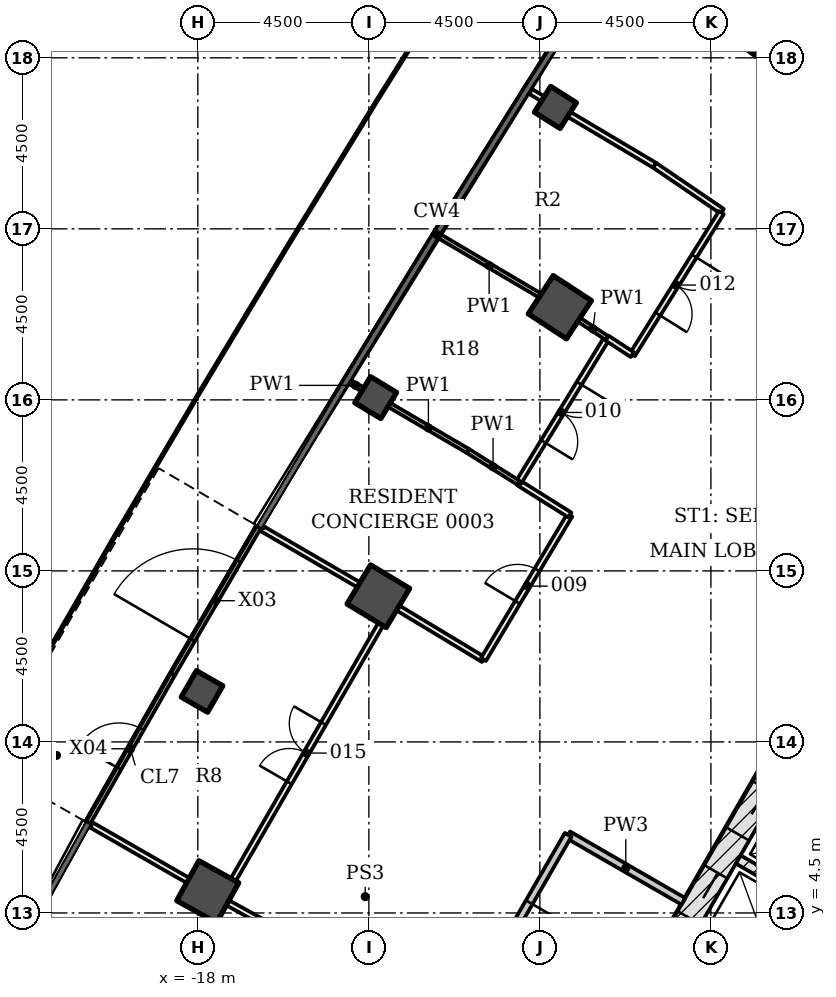
"""IFC4 building model, lengths in metres.
Left out: names, types, materials, properties, quantities, classifications, styles, units other than length and angle.
Written with IfcOpenShell. Run it as: python <this file> out.ifc"""

import sys

from ifc_helpers import new_model, si_unit, direction, frame, frame_2d, origin, origin_2d, place, context, subcontext, project, spatial, rectangle, extrude, element, fill, save


model = new_model("IFC4")
c1 = context("Model", 3, precision=1e-05, world=origin(), true_north=direction((0.0, 1.0)))
c2 = subcontext(c1, "Body", "Model", "MODEL_VIEW")
j1 = project(units=[si_unit("LENGTHUNIT", "METRE"), si_unit("PLANEANGLEUNIT", "RADIAN")], contexts=[c1])
p1 = place(None, origin())
s1 = spatial("IfcSite", under=j1, at=p1, CompositionType="ELEMENT")
p2 = place(p1, origin())
s2 = spatial("IfcBuilding", under=s1, at=p2, CompositionType="ELEMENT")
p3 = place(p2, origin())
s3 = spatial("IfcBuildingStorey", under=s2, at=p3, CompositionType="ELEMENT", Elevation=0.0)
for number, where, z_axis, x_axis in (
    (1, (-3.421, 27.86, -0.25), (0.0, 0.0, 1.0), (-0.816, 0.578, 0.0)),
    (2, (-8.475, 20.438, -0.25), (0.0, 0.0, 1.0), (-0.837, 0.547, 0.0)),
    (3, (-13.25, 12.834, -0.25), (0.0, 0.0, 1.0), (-0.857, 0.516, 0.0)),
    (4, (-17.739, 5.058, -0.25), (0.0, 0.0, 1.0), (-0.875, 0.484, 0.0)),
):
    element("IfcColumn", number, at=place(p3, frame(where, z_axis=z_axis, x_axis=x_axis)), inside=s3, PredefinedType="COLUMN", context=c2, shape_type="SweptSolid", body=[
        extrude(rectangle(XDim=1.2, YDim=1.2, at=origin_2d()), origin(), (0.0, 0.0, 1.0), 6.0),
    ])
for number, where, z_axis, x_axis in (
    (5, (-8.592, 25.695, -0.25), (0.0, 0.0, 1.0), (-0.845, 0.535, 0.0)),
    (6, (-13.32, 18.059, -0.25), (0.0, 0.0, 1.0), (-0.856, 0.518, 0.0)),
    (7, (-17.89, 10.329, -0.25), (0.0, 0.0, 1.0), (-0.866, 0.5, 0.0)),
):
    element("IfcColumn", number, at=place(p3, frame(where, z_axis=z_axis, x_axis=x_axis)), inside=s3, PredefinedType="COLUMN", context=c2, shape_type="SweptSolid", body=[
        extrude(rectangle(XDim=0.8, YDim=0.8, at=origin_2d()), origin(), (0.0, 0.0, 1.0), 6.0),
    ])
p4 = place(p3, frame((-1.083, 11.281, -0.25), z_axis=(0.0, 0.0, 1.0), x_axis=(-0.500001446645, -0.866024568562, 0.0)))
e8 = element("IfcWall", 8, at=p4, inside=s3, PredefinedType="SHEAR", context=c2, shape_type="SweptSolid", body=[
    extrude(rectangle(XDim=18.458, YDim=0.7, at=frame_2d((9.229, 0.0))), origin(), (0.0, 0.0, 1.0), 6.0),
])
p5 = place(p4, frame((4.029, 0.0, 0.25)))
e9 = element("IfcOpeningElement", 9, at=p5, cuts=e8, PredefinedType="OPENING", context=c2, shape_type="SweptSolid", body=[
    extrude(rectangle(XDim=1.4, YDim=2.1, at=frame_2d((0.7, 1.05))), frame((0.0, 0.36, 0.0), z_axis=(0.0, -1.0, 0.0), x_axis=(1.0, 0.0, 0.0)), (0.0, 0.0, 1.0), 0.72),
])
p6 = place(p4, frame((6.579, 0.0, 0.25)))
e10 = element("IfcOpeningElement", 10, at=p6, cuts=e8, PredefinedType="OPENING", context=c2, shape_type="SweptSolid", body=[
    extrude(rectangle(XDim=1.4, YDim=2.1, at=frame_2d((0.7, 1.05))), frame((0.0, 0.36, 0.0), z_axis=(0.0, -1.0, 0.0), x_axis=(1.0, 0.0, 0.0)), (0.0, 0.0, 1.0), 0.72),
])
p7 = place(p4, frame((8.979, 0.0, 0.25)))
e11 = element("IfcOpeningElement", 11, at=p7, cuts=e8, PredefinedType="OPENING", context=c2, shape_type="SweptSolid", body=[
    extrude(rectangle(XDim=1.2, YDim=2.1, at=frame_2d((0.6, 1.05))), frame((0.0, 0.36, 0.0), z_axis=(0.0, -1.0, 0.0), x_axis=(1.0, 0.0, 0.0)), (0.0, 0.0, 1.0), 0.72),
])
p8 = place(p4, frame((11.029, 0.0, 0.25)))
e12 = element("IfcOpeningElement", 12, at=p8, cuts=e8, PredefinedType="OPENING", context=c2, shape_type="SweptSolid", body=[
    extrude(rectangle(XDim=1.2, YDim=2.1, at=frame_2d((0.6, 1.05))), frame((0.0, 0.36, 0.0), z_axis=(0.0, -1.0, 0.0), x_axis=(1.0, 0.0, 0.0)), (0.0, 0.0, 1.0), 0.72),
])
p9 = place(p4, frame((13.179, 0.0, 0.25)))
e13 = element("IfcOpeningElement", 13, at=p9, cuts=e8, PredefinedType="OPENING", context=c2, shape_type="SweptSolid", body=[
    extrude(rectangle(XDim=1.3, YDim=2.1, at=frame_2d((0.65, 1.05))), frame((0.0, 0.36, 0.0), z_axis=(0.0, -1.0, 0.0), x_axis=(1.0, 0.0, 0.0)), (0.0, 0.0, 1.0), 0.72),
])
p10 = place(p3, frame((-18.66, 10.775, 0.0), z_axis=(0.0, 0.0, 1.0), x_axis=(0.50445499627, 0.86343798662, 0.0)))
e14 = element("IfcWall", 14, at=p10, inside=s3, PredefinedType="NOTDEFINED", context=c2, shape_type="SweptSolid", body=[
    extrude(rectangle(XDim=4.496, YDim=0.12, at=frame_2d((2.248, 0.0))), origin(), (0.0, 0.0, 1.0), 5.75),
])
p11 = place(p10, frame((1.048, 0.0, 0.0)))
e15 = element("IfcOpeningElement", 15, at=p11, cuts=e14, PredefinedType="OPENING", context=c2, shape_type="SweptSolid", body=[
    extrude(rectangle(XDim=2.4, YDim=2.4, at=frame_2d((1.2, 1.2))), frame((0.0, 0.07, 0.0), z_axis=(0.0, -1.0, 0.0), x_axis=(1.0, 0.0, 0.0)), (0.0, 0.0, 1.0), 0.14),
])
p12 = place(p3, frame((-20.889, 6.867, 0.0), z_axis=(0.0, 0.0, 1.0), x_axis=(0.495501388328, 0.868607146048, 0.0)))
e16 = element("IfcWall", 16, at=p12, inside=s3, PredefinedType="NOTDEFINED", context=c2, shape_type="SweptSolid", body=[
    extrude(rectangle(XDim=4.496, YDim=0.12, at=frame_2d((2.248, 0.0))), origin(), (0.0, 0.0, 1.0), 5.75),
])
p13 = place(p12, frame((1.648, 0.0, 0.0)))
e17 = element("IfcOpeningElement", 17, at=p13, cuts=e16, PredefinedType="OPENING", context=c2, shape_type="SweptSolid", body=[
    extrude(rectangle(XDim=1.2, YDim=2.4, at=frame_2d((0.6, 1.2))), frame((0.0, 0.07, 0.0), z_axis=(0.0, -1.0, 0.0), x_axis=(1.0, 0.0, 0.0)), (0.0, 0.0, 1.0), 0.14),
])
p14 = place(p3, frame((-3.781, 5.907, -0.25), z_axis=(0.0, 0.0, 1.0), x_axis=(0.866032775405, -0.499987231761, 0.0)))
e18 = element("IfcWall", 18, at=p14, inside=s3, PredefinedType="PARTITIONING", context=c2, shape_type="SweptSolid", body=[
    extrude(rectangle(XDim=2.9, YDim=0.25, at=frame_2d((1.45, 0.0))), origin(), (0.0, 0.0, 1.0), 6.0),
])
p15 = place(p3, frame((0.176, 6.711, 0.0), z_axis=(0.0, 0.0, 1.0), x_axis=(-0.500004227369, -0.866022963098, 0.0)))
e19 = element("IfcWall", 19, at=p15, inside=s3, PredefinedType="PARTITIONING", context=c2, shape_type="SweptSolid", body=[
    extrude(rectangle(XDim=11.8, YDim=0.25, at=frame_2d((5.9, 0.0))), origin(), (0.0, 0.0, 1.0), 5.75),
])
p16 = place(p3, frame((-18.26, 5.356, 0.0), z_axis=(0.0, 0.0, 1.0), x_axis=(-0.867382463281, 0.497642102714, 0.0)))
e20 = element("IfcWall", 20, at=p16, inside=s3, PredefinedType="PARTITIONING", context=c2, shape_type="SweptSolid", body=[
    extrude(rectangle(XDim=2.972, YDim=0.15, at=frame_2d((1.486, 0.0))), origin(), (0.0, 0.0, 1.0), 5.133),
])
p17 = place(p3, frame((-15.615, 3.883, 0.0), z_axis=(0.0, 0.0, 1.0), x_axis=(-0.875170076202, 0.483815396325, 0.0)))
e21 = element("IfcWall", 21, at=p17, inside=s3, PredefinedType="PARTITIONING", context=c2, shape_type="SweptSolid", body=[
    extrude(rectangle(XDim=1.827, YDim=0.15, at=frame_2d((0.914, 0.0))), origin(), (0.0, 0.0, 1.0), 5.138),
])
p18 = place(p3, frame((-5.225, 4.806, 0.0), z_axis=(0.0, 0.0, 1.0), x_axis=(-0.865932233204, 0.500161341467, 0.0)))
e22 = element("IfcWall", 22, at=p18, inside=s3, PredefinedType="PARTITIONING", context=c2, shape_type="SweptSolid", body=[
    extrude(rectangle(XDim=3.499, YDim=0.2, at=frame_2d((1.75, 0.0))), origin(), (0.0, 0.0, 1.0), 5.75),
])
p19 = place(p3, frame((-8.256, 6.556, 0.0), z_axis=(0.0, 0.0, 1.0), x_axis=(-0.500040756506, -0.866001871726, 0.0)))
e23 = element("IfcWall", 23, at=p19, inside=s3, PredefinedType="PARTITIONING", context=c2, shape_type="SweptSolid", body=[
    extrude(rectangle(XDim=5.599, YDim=0.2, at=frame_2d((2.8, 0.0))), origin(), (0.0, 0.0, 1.0), 5.138),
])
p20 = place(p19, frame((2.05, 0.0, 0.0)))
e24 = element("IfcOpeningElement", 24, at=p20, cuts=e23, PredefinedType="OPENING", context=c2, shape_type="SweptSolid", body=[
    extrude(rectangle(XDim=1.5, YDim=2.1, at=frame_2d((0.75, 1.05))), frame((0.0, 0.11, 0.0), z_axis=(0.0, -1.0, 0.0), x_axis=(1.0, 0.0, 0.0)), (0.0, 0.0, 1.0), 0.22),
])
p21 = place(p3, frame((-13.769, 13.135, 0.0), z_axis=(0.0, 0.0, 1.0), x_axis=(-0.864594359068, 0.502470490943, 0.0)))
e25 = element("IfcWall", 25, at=p21, inside=s3, PredefinedType="PARTITIONING", context=c2, shape_type="SweptSolid", body=[
    extrude(rectangle(XDim=2.971, YDim=0.15, at=frame_2d((1.486, 0.0))), origin(), (0.0, 0.0, 1.0), 5.133),
])
p22 = place(p3, frame((-17.068, 5.372, 0.0), z_axis=(0.0, 0.0, 1.0), x_axis=(0.499910285078, 0.866077194523, 0.0)))
e26 = element("IfcWall", 26, at=p22, inside=s3, PredefinedType="PARTITIONING", context=c2, shape_type="SweptSolid", body=[
    extrude(rectangle(XDim=7.764, YDim=0.15, at=frame_2d((3.882, 0.0))), origin(), (0.0, 0.0, 1.0), 5.138),
])
p23 = place(p22, frame((2.95, 0.0, 0.0)))
e27 = element("IfcOpeningElement", 27, at=p23, cuts=e26, PredefinedType="OPENING", context=c2, shape_type="SweptSolid", body=[
    extrude(rectangle(XDim=1.8, YDim=2.1, at=frame_2d((0.9, 1.05))), frame((0.0, 0.085, 0.0), z_axis=(0.0, -1.0, 0.0), x_axis=(1.0, 0.0, 0.0)), (0.0, 0.0, 1.0), 0.17),
])
p24 = place(p3, frame((-12.735, 12.524, 0.0), z_axis=(0.0, 0.0, 1.0), x_axis=(0.856490884452, -0.516162149766, 0.0)))
e28 = element("IfcWall", 28, at=p24, inside=s3, PredefinedType="PARTITIONING", context=c2, shape_type="SweptSolid", body=[
    extrude(rectangle(XDim=2.627, YDim=0.15, at=frame_2d((1.313, 0.0))), origin(), (0.0, 0.0, 1.0), 5.138),
])
p25 = place(p3, frame((-10.485, 11.169, 0.0), z_axis=(0.0, 0.0, 1.0), x_axis=(0.513360176277, 0.858173251397, 0.0)))
e29 = element("IfcWall", 29, at=p25, inside=s3, PredefinedType="PARTITIONING", context=c2, shape_type="SweptSolid", body=[
    extrude(rectangle(XDim=4.428, YDim=0.15, at=frame_2d((2.214, 0.0))), origin(), (0.0, 0.0, 1.0), 5.138),
])
p26 = place(p25, frame((1.75, 0.0, 0.0)))
e30 = element("IfcOpeningElement", 30, at=p26, cuts=e29, PredefinedType="OPENING", context=c2, shape_type="SweptSolid", body=[
    extrude(rectangle(XDim=1.0, YDim=2.1, at=frame_2d((0.5, 1.05))), frame((0.0, 0.085, 0.0), z_axis=(0.0, -1.0, 0.0), x_axis=(1.0, 0.0, 0.0)), (0.0, 0.0, 1.0), 0.17),
])
p27 = place(p3, frame((-8.211, 14.971, 0.0), z_axis=(0.0, 0.0, 1.0), x_axis=(-0.846915577331, 0.531727378338, 0.0)))
e31 = element("IfcWall", 31, at=p27, inside=s3, PredefinedType="PARTITIONING", context=c2, shape_type="SweptSolid", body=[
    extrude(rectangle(XDim=1.599, YDim=0.15, at=frame_2d((0.799, 0.0))), origin(), (0.0, 0.0, 1.0), 5.138),
])
p28 = place(p3, frame((-13.658, 18.273, 0.0), z_axis=(0.0, 0.0, 1.0), x_axis=(-0.863201611898, 0.504859363801, 0.0)))
e32 = element("IfcWall", 32, at=p28, inside=s3, PredefinedType="PARTITIONING", context=c2, shape_type="SweptSolid", body=[
    extrude(rectangle(XDim=0.43, YDim=0.12, at=frame_2d((0.215, 0.0))), origin(), (0.0, 0.0, 1.0), 5.75),
])
p29 = place(p3, frame((-9.567, 15.822, 0.0), z_axis=(0.0, 0.0, 1.0), x_axis=(-0.846844435925, 0.531840672892, 0.0)))
e33 = element("IfcWall", 33, at=p29, inside=s3, PredefinedType="PARTITIONING", context=c2, shape_type="SweptSolid", body=[
    extrude(rectangle(XDim=1.572, YDim=0.12, at=frame_2d((0.786, 0.0))), origin(), (0.0, 0.0, 1.0), 5.138),
])
p30 = place(p3, frame((-10.898, 16.658, 0.0), z_axis=(0.0, 0.0, 1.0), x_axis=(-0.863161652457, 0.504927679701, 0.0)))
e34 = element("IfcWall", 34, at=p30, inside=s3, PredefinedType="PARTITIONING", context=c2, shape_type="SweptSolid", body=[
    extrude(rectangle(XDim=2.398, YDim=0.12, at=frame_2d((1.199, 0.0))), origin(), (0.0, 0.0, 1.0), 5.138),
])
p31 = place(p3, frame((-7.26, 19.588, 0.0), z_axis=(0.0, 0.0, 1.0), x_axis=(-0.522038122716, -0.852922152621, 0.0)))
e35 = element("IfcWall", 35, at=p31, inside=s3, PredefinedType="PARTITIONING", context=c2, shape_type="SweptSolid", body=[
    extrude(rectangle(XDim=4.415, YDim=0.15, at=frame_2d((2.208, 0.0))), origin(), (0.0, 0.0, 1.0), 5.138),
])
p32 = place(p31, frame((1.35, 0.0, 0.0)))
e36 = element("IfcOpeningElement", 36, at=p32, cuts=e35, PredefinedType="OPENING", context=c2, shape_type="SweptSolid", body=[
    extrude(rectangle(XDim=1.8, YDim=2.1, at=frame_2d((0.9, 1.05))), frame((0.0, 0.085, 0.0), z_axis=(0.0, -1.0, 0.0), x_axis=(1.0, 0.0, 0.0)), (0.0, 0.0, 1.0), 0.17),
])
p33 = place(p3, frame((-9.29, 26.141, 0.0), z_axis=(0.0, 0.0, 1.0), x_axis=(0.860041962333, -0.510223307019, 0.0)))
e37 = element("IfcWall", 37, at=p33, inside=s3, PredefinedType="PARTITIONING", context=c2, shape_type="SweptSolid", body=[
    extrude(rectangle(XDim=0.429, YDim=0.15, at=frame_2d((0.215, 0.0))), origin(), (0.0, 0.0, 1.0), 5.75),
])
p34 = place(p3, frame((-8.233, 25.512, 0.0), z_axis=(0.0, 0.0, 1.0), x_axis=(0.859460620951, -0.51120195719, 0.0)))
e38 = element("IfcWall", 38, at=p34, inside=s3, PredefinedType="PARTITIONING", context=c2, shape_type="SweptSolid", body=[
    extrude(rectangle(XDim=2.619, YDim=0.15, at=frame_2d((1.31, 0.0))), origin(), (0.0, 0.0, 1.0), 5.138),
])
p35 = place(p3, frame((-5.982, 24.173, 0.0), z_axis=(0.0, 0.0, 1.0), x_axis=(0.826407250565, -0.563072869364, 0.0)))
e39 = element("IfcWall", 39, at=p35, inside=s3, PredefinedType="PARTITIONING", context=c2, shape_type="SweptSolid", body=[
    extrude(rectangle(XDim=2.153, YDim=0.15, at=frame_2d((1.076, 0.0))), origin(), (0.0, 0.0, 1.0), 5.138),
])
p36 = place(p3, frame((-4.224, 22.928, 0.0), z_axis=(0.0, 0.0, 1.0), x_axis=(-0.53074011621, -0.847534618199, 0.0)))
e40 = element("IfcWall", 40, at=p36, inside=s3, PredefinedType="PARTITIONING", context=c2, shape_type="SweptSolid", body=[
    extrude(rectangle(XDim=4.41, YDim=0.15, at=frame_2d((2.205, 0.0))), origin(), (0.0, 0.0, 1.0), 5.138),
])
p37 = place(p36, frame((1.35, 0.0, 0.0)))
e41 = element("IfcOpeningElement", 41, at=p37, cuts=e40, PredefinedType="OPENING", context=c2, shape_type="SweptSolid", body=[
    extrude(rectangle(XDim=1.8, YDim=2.1, at=frame_2d((0.9, 1.05))), frame((0.0, 0.085, 0.0), z_axis=(0.0, -1.0, 0.0), x_axis=(1.0, 0.0, 0.0)), (0.0, 0.0, 1.0), 0.17),
])
p38 = place(p3, frame((-6.567, 19.19, 0.0), z_axis=(0.0, 0.0, 1.0), x_axis=(-0.837253455451, 0.546815006502, 0.0)))
e42 = element("IfcWall", 42, at=p38, inside=s3, PredefinedType="PARTITIONING", context=c2, shape_type="SweptSolid", body=[
    extrude(rectangle(XDim=0.803, YDim=0.15, at=frame_2d((0.401, 0.0))), origin(), (0.0, 0.0, 1.0), 5.138),
])
p39 = place(p3, frame((-8.992, 20.743, 0.0), z_axis=(0.0, 0.0, 1.0), x_axis=(-0.861458975043, 0.507827169733, 0.0)))
e43 = element("IfcWall", 43, at=p39, inside=s3, PredefinedType="PARTITIONING", context=c2, shape_type="SweptSolid", body=[
    extrude(rectangle(XDim=3.119, YDim=0.12, at=frame_2d((1.56, 0.0))), origin(), (0.0, 0.0, 1.0), 5.133),
])
p40 = place(p3, frame((-7.232, 19.625, 0.0), z_axis=(0.0, 0.0, 1.0), x_axis=(-0.837275659531, 0.546781007312, 0.0)))
e44 = element("IfcWall", 44, at=p40, inside=s3, PredefinedType="PARTITIONING", context=c2, shape_type="SweptSolid", body=[
    extrude(rectangle(XDim=0.885, YDim=0.12, at=frame_2d((0.442, 0.0))), origin(), (0.0, 0.0, 1.0), 5.138),
])
p41 = place(p11, origin())
e45 = element("IfcDoor", 45, at=p41, inside=s3, OperationType="REVOLVING", PredefinedType="DOOR", context=c2, shape_type="SweptSolid", body=[
    extrude(rectangle(XDim=2.4, YDim=2.4, at=frame_2d((1.2, 1.2))), frame((0.0, 0.025, 0.0), z_axis=(0.0, -1.0, 0.0), x_axis=(1.0, 0.0, 0.0)), (0.0, 0.0, 1.0), 0.05),
])
fill(e15, e45)
p42 = place(p13, origin())
e46 = element("IfcDoor", 46, at=p42, inside=s3, OperationType="SINGLE_SWING_LEFT", PredefinedType="DOOR", context=c2, shape_type="SweptSolid", body=[
    extrude(rectangle(XDim=1.2, YDim=2.4, at=frame_2d((0.6, 1.2))), frame((0.0, 0.025, 0.0), z_axis=(0.0, -1.0, 0.0), x_axis=(1.0, 0.0, 0.0)), (0.0, 0.0, 1.0), 0.05),
])
fill(e17, e46)
p43 = place(p5, origin())
e47 = element("IfcDoor", 47, at=p43, inside=s3, OperationType="DOUBLE_DOOR_SLIDING", PredefinedType="DOOR", context=c2, shape_type="SweptSolid", body=[
    extrude(rectangle(XDim=1.4, YDim=2.1, at=frame_2d((0.7, 1.05))), frame((0.0, 0.025, 0.0), z_axis=(0.0, -1.0, 0.0), x_axis=(1.0, 0.0, 0.0)), (0.0, 0.0, 1.0), 0.05),
])
fill(e9, e47)
p44 = place(p6, origin())
e48 = element("IfcDoor", 48, at=p44, inside=s3, OperationType="DOUBLE_DOOR_SLIDING", PredefinedType="DOOR", context=c2, shape_type="SweptSolid", body=[
    extrude(rectangle(XDim=1.4, YDim=2.1, at=frame_2d((0.7, 1.05))), frame((0.0, 0.025, 0.0), z_axis=(0.0, -1.0, 0.0), x_axis=(1.0, 0.0, 0.0)), (0.0, 0.0, 1.0), 0.05),
])
fill(e10, e48)
p45 = place(p26, origin())
e49 = element("IfcDoor", 49, at=p45, inside=s3, OperationType="SINGLE_SWING_RIGHT", PredefinedType="DOOR", context=c2, shape_type="SweptSolid", body=[
    extrude(rectangle(XDim=1.0, YDim=2.1, at=frame_2d((0.5, 1.05))), frame((0.0, 0.025, 0.0), z_axis=(0.0, -1.0, 0.0), x_axis=(1.0, 0.0, 0.0)), (0.0, 0.0, 1.0), 0.05),
])
fill(e30, e49)
p46 = place(p32, origin())
e50 = element("IfcDoor", 50, at=p46, inside=s3, OperationType="DOUBLE_DOOR_SINGLE_SWING", PredefinedType="DOOR", context=c2, shape_type="SweptSolid", body=[
    extrude(rectangle(XDim=1.8, YDim=2.1, at=frame_2d((0.9, 1.05))), frame((0.0, 0.025, 0.0), z_axis=(0.0, -1.0, 0.0), x_axis=(1.0, 0.0, 0.0)), (0.0, 0.0, 1.0), 0.05),
])
fill(e36, e50)
p47 = place(p37, origin())
e51 = element("IfcDoor", 51, at=p47, inside=s3, OperationType="DOUBLE_DOOR_SINGLE_SWING", PredefinedType="DOOR", context=c2, shape_type="SweptSolid", body=[
    extrude(rectangle(XDim=1.8, YDim=2.1, at=frame_2d((0.9, 1.05))), frame((0.0, 0.025, 0.0), z_axis=(0.0, -1.0, 0.0), x_axis=(1.0, 0.0, 0.0)), (0.0, 0.0, 1.0), 0.05),
])
fill(e41, e51)
p48 = place(p20, origin())
e52 = element("IfcDoor", 52, at=p48, inside=s3, OperationType="DOUBLE_DOOR_SINGLE_SWING", PredefinedType="DOOR", context=c2, shape_type="SweptSolid", body=[
    extrude(rectangle(XDim=1.5, YDim=2.1, at=frame_2d((0.75, 1.05))), frame((0.0, 0.025, 0.0), z_axis=(0.0, -1.0, 0.0), x_axis=(1.0, 0.0, 0.0)), (0.0, 0.0, 1.0), 0.05),
])
fill(e24, e52)
p49 = place(p23, origin())
e53 = element("IfcDoor", 53, at=p49, inside=s3, OperationType="DOUBLE_DOOR_SINGLE_SWING", PredefinedType="DOOR", context=c2, shape_type="SweptSolid", body=[
    extrude(rectangle(XDim=1.8, YDim=2.1, at=frame_2d((0.9, 1.05))), frame((0.0, 0.025, 0.0), z_axis=(0.0, -1.0, 0.0), x_axis=(1.0, 0.0, 0.0)), (0.0, 0.0, 1.0), 0.05),
])
fill(e27, e53)
save(model, sys.argv[1])
